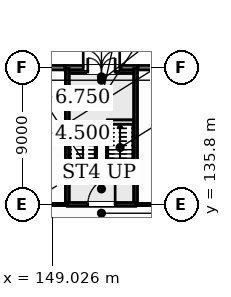
"""IFC4 building model, lengths in metres.
Left out: names, types, materials, properties, quantities, classifications, styles, units other than length and angle.
Written with IfcOpenShell. Run it as: python <this file> out.ifc"""

import sys

from ifc_helpers import new_model, si_unit, direction, frame, frame_2d, origin, place, context, subcontext, project, spatial, rectangle, extrude, element, fill, save


model = new_model("IFC4")
c1 = context("Model", 3, precision=1e-05, world=origin(), true_north=direction((0.0, 1.0)))
c2 = subcontext(c1, "Body", "Model", "MODEL_VIEW")
j1 = project(units=[si_unit("LENGTHUNIT", "METRE"), si_unit("PLANEANGLEUNIT", "RADIAN")], contexts=[c1])
p1 = place(None, origin())
s1 = spatial("IfcSite", under=j1, at=p1, CompositionType="ELEMENT")
p2 = place(p1, origin())
s2 = spatial("IfcBuilding", under=s1, at=p2, CompositionType="ELEMENT")
p3 = place(p2, origin())
s3 = spatial("IfcBuildingStorey", under=s2, at=p3, CompositionType="ELEMENT", Elevation=0.0)
p4 = place(p3, frame((148.65, 144.8, 0.0), z_axis=(0.0, 0.0, 1.0), x_axis=(1.0, 0.0, 0.0)))
e1 = element("IfcWall", 1, at=p4, inside=s3, PredefinedType="SOLIDWALL", context=c2, shape_type="SweptSolid", body=[
    extrude(rectangle(XDim=1.2, YDim=0.3, at=frame_2d((0.6, 0.0))), origin(), (0.0, 0.0, 1.0), 8.1),
])
p5 = place(p3, frame((154.65, 144.8, 0.0), z_axis=(0.0, 0.0, 1.0), x_axis=(1.0, 0.0, 0.0)))
e2 = element("IfcWall", 2, at=p5, inside=s3, PredefinedType="SOLIDWALL", context=c2, shape_type="SweptSolid", body=[
    extrude(rectangle(XDim=4.05, YDim=0.3, at=frame_2d((2.025, 0.0))), origin(), (0.0, 0.0, 1.0), 8.1),
])
p6 = place(p3, frame((149.85, 144.8, 0.0), z_axis=(0.0, 0.0, 1.0), x_axis=(1.0, 0.0, 0.0)))
e3 = element("IfcWall", 3, at=p6, inside=s3, PredefinedType="SOLIDWALL", context=c2, shape_type="SweptSolid", body=[
    extrude(rectangle(XDim=4.8, YDim=0.3, at=frame_2d((2.4, 0.0))), origin(), (0.0, 0.0, 1.0), 8.1),
])
p7 = place(p6, frame((1.2, 0.0, 0.0)))
e4 = element("IfcOpeningElement", 4, at=p7, cuts=e3, PredefinedType="OPENING", context=c2, shape_type="SweptSolid", body=[
    extrude(rectangle(XDim=2.4, YDim=2.4, at=frame_2d((1.2, 1.2))), frame((0.0, 0.16, 0.0), z_axis=(0.0, -1.0, 0.0), x_axis=(1.0, 0.0, 0.0)), (0.0, 0.0, 1.0), 0.32),
])
p8 = place(p3, frame((150.0, 135.8, 0.0), z_axis=(0.0, 0.0, 1.0), x_axis=(1.0, 0.0, 0.0)))
e5 = element("IfcWall", 5, at=p8, inside=s3, PredefinedType="PARTITIONING", context=c2, shape_type="SweptSolid", body=[
    extrude(rectangle(XDim=4.5, YDim=0.25, at=frame_2d((2.25, 0.0))), origin(), (0.0, 0.0, 1.0), 8.5),
])
p9 = place(p8, frame((1.35, 0.0, 0.0)))
e6 = element("IfcOpeningElement", 6, at=p9, cuts=e5, PredefinedType="OPENING", context=c2, shape_type="SweptSolid", body=[
    extrude(rectangle(XDim=1.8, YDim=2.1, at=frame_2d((0.9, 1.05))), frame((0.0, 0.135, 0.0), z_axis=(0.0, -1.0, 0.0), x_axis=(1.0, 0.0, 0.0)), (0.0, 0.0, 1.0), 0.27),
])
p10 = place(p3, frame((148.5, 135.8, 0.0), z_axis=(0.0, 0.0, 1.0), x_axis=(1.0, 0.0, 0.0)))
e7 = element("IfcWall", 7, at=p10, inside=s3, PredefinedType="PARTITIONING", context=c2, shape_type="SweptSolid", body=[
    extrude(rectangle(XDim=1.5, YDim=0.15, at=frame_2d((0.75, 0.0))), origin(), (0.0, 0.0, 1.0), 8.5),
])
p11 = place(p3, frame((154.5, 135.8, 0.0), z_axis=(0.0, 0.0, 1.0), x_axis=(1.0, 0.0, 0.0)))
e8 = element("IfcWall", 8, at=p11, inside=s3, PredefinedType="PARTITIONING", context=c2, shape_type="SweptSolid", body=[
    extrude(rectangle(XDim=5.05, YDim=0.15, at=frame_2d((2.525, 0.0))), origin(), (0.0, 0.0, 1.0), 8.5),
])
for number, where, z_axis, x_axis in (
    (9, (150.0, 135.925, 0.0), (0.0, 0.0, 1.0), (0.0, 1.0, 0.0)),
    (10, (154.5, 135.925, 0.0), (0.0, 0.0, 1.0), (0.0, 1.0, 0.0)),
):
    element("IfcWall", number, at=place(p3, frame(where, z_axis=z_axis, x_axis=x_axis)), inside=s3, PredefinedType="PARTITIONING", context=c2, shape_type="SweptSolid", body=[
        extrude(rectangle(XDim=8.825, YDim=0.25, at=frame_2d((4.413, 0.0))), origin(), (0.0, 0.0, 1.0), 8.5),
    ])
p12 = place(p3, frame((150.125, 144.538, 0.0), z_axis=(0.0, 0.0, 1.0), x_axis=(1.0, 0.0, 0.0)))
e11 = element("IfcWall", 11, at=p12, inside=s3, PredefinedType="PARTITIONING", context=c2, shape_type="SweptSolid", body=[
    extrude(rectangle(XDim=4.25, YDim=0.225, at=frame_2d((2.125, 0.0))), origin(), (0.0, 0.0, 1.0), 8.5),
])
p13 = place(p12, frame((1.225, 0.0, 0.0)))
e12 = element("IfcOpeningElement", 12, at=p13, cuts=e11, PredefinedType="OPENING", context=c2, shape_type="SweptSolid", body=[
    extrude(rectangle(XDim=1.8, YDim=2.1, at=frame_2d((0.9, 1.05))), frame((0.0, 0.123, 0.0), z_axis=(0.0, -1.0, 0.0), x_axis=(1.0, 0.0, 0.0)), (0.0, 0.0, 1.0), 0.245),
])
p14 = place(p7, origin())
e13 = element("IfcDoor", 13, at=p14, inside=s3, OperationType="DOUBLE_DOOR_DOUBLE_SWING", PredefinedType="DOOR", context=c2, shape_type="SweptSolid", body=[
    extrude(rectangle(XDim=2.4, YDim=2.4, at=frame_2d((1.2, 1.2))), frame((0.0, 0.025, 0.0), z_axis=(0.0, -1.0, 0.0), x_axis=(1.0, 0.0, 0.0)), (0.0, 0.0, 1.0), 0.05),
])
fill(e4, e13)
p15 = place(p9, origin())
e14 = element("IfcDoor", 14, at=p15, inside=s3, OperationType="SINGLE_SWING_RIGHT", PredefinedType="DOOR", context=c2, shape_type="SweptSolid", body=[
    extrude(rectangle(XDim=1.8, YDim=2.1, at=frame_2d((0.9, 1.05))), frame((0.0, 0.025, 0.0), z_axis=(0.0, -1.0, 0.0), x_axis=(1.0, 0.0, 0.0)), (0.0, 0.0, 1.0), 0.05),
])
fill(e6, e14)
p16 = place(p13, origin())
e15 = element("IfcDoor", 15, at=p16, inside=s3, OperationType="DOUBLE_DOOR_DOUBLE_SWING", PredefinedType="DOOR", context=c2, shape_type="SweptSolid", body=[
    extrude(rectangle(XDim=1.8, YDim=2.1, at=frame_2d((0.9, 1.05))), frame((0.0, 0.025, 0.0), z_axis=(0.0, -1.0, 0.0), x_axis=(1.0, 0.0, 0.0)), (0.0, 0.0, 1.0), 0.05),
])
fill(e12, e15)
save(model, sys.argv[1])
